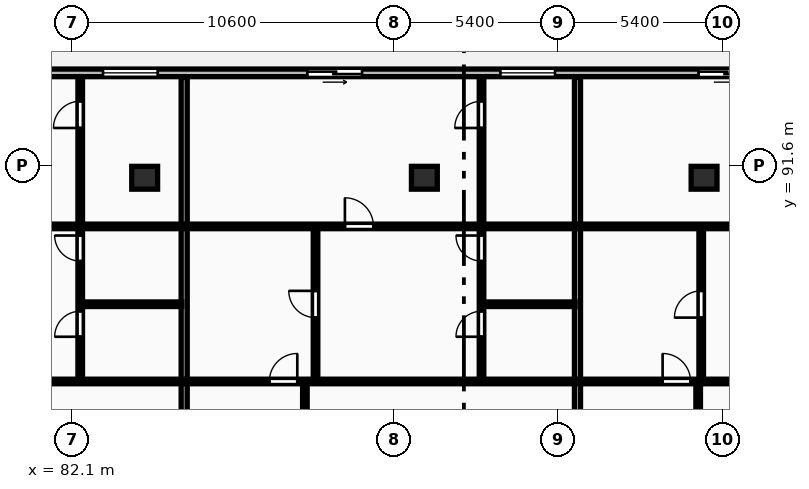
"""IFC4 building model, lengths in metres.
Left out: names, types, materials, properties, quantities, classifications, styles, units other than length and angle.
Written with IfcOpenShell. Run it as: python <this file> out.ifc"""

import sys

from ifc_helpers import new_model, si_unit, direction, frame, frame_2d, origin, origin_2d, place, context, subcontext, project, spatial, rectangle, extrude, element, fill, save


model = new_model("IFC4")
c1 = context("Model", 3, precision=1e-05, world=origin(), true_north=direction((0.0, 1.0)))
c2 = subcontext(c1, "Body", "Model", "MODEL_VIEW")
j1 = project(units=[si_unit("LENGTHUNIT", "METRE"), si_unit("PLANEANGLEUNIT", "RADIAN")], contexts=[c1])
p1 = place(None, origin())
s1 = spatial("IfcSite", under=j1, at=p1, CompositionType="ELEMENT")
p2 = place(p1, origin())
s2 = spatial("IfcBuilding", under=s1, at=p2, CompositionType="ELEMENT")
p3 = place(p2, frame((0.0, 0.0, 207.6)))
s3 = spatial("IfcBuildingStorey", under=s2, at=p3, CompositionType="ELEMENT", Elevation=207.6)
for number, where, z_axis, x_axis in (
    (1, (84.5, 91.2, 0.0), (0.0, 0.0, 1.0), (1.0, 0.0, 0.0)),
    (2, (93.7, 91.2, 0.0), (0.0, 0.0, 1.0), (1.0, 0.0, 0.0)),
    (3, (102.9, 91.2, 0.0), (0.0, 0.0, 1.0), (1.0, 0.0, 0.0)),
):
    element("IfcColumn", number, at=place(p3, frame(where, z_axis=z_axis, x_axis=x_axis)), inside=s3, PredefinedType="COLUMN", context=c2, shape_type="SweptSolid", body=[
        extrude(rectangle(XDim=0.85, YDim=0.75, at=origin_2d()), origin(), (0.0, 0.0, 1.0), 3.25),
    ])
p4 = place(p3, frame((128.4, 94.65, 0.0), z_axis=(0.0, 0.0, 1.0), x_axis=(-1.0, 0.0, 0.0)))
e4 = element("IfcWall", 4, at=p4, inside=s3, PredefinedType="STANDARD", context=c2, shape_type="SweptSolid", body=[
    extrude(rectangle(XDim=68.6, YDim=0.25, at=frame_2d((34.3, 0.0))), origin(), (0.0, 0.0, 1.0), 2.97),
])
p5 = place(p4, frame((62.6, 0.0, 0.0)))
e5 = element("IfcOpeningElement", 5, at=p5, cuts=e4, PredefinedType="OPENING", context=c2, shape_type="SweptSolid", body=[
    extrude(rectangle(XDim=1.8, YDim=2.2, at=frame_2d((0.9, 1.1))), frame((0.0, 0.135, 0.0), z_axis=(0.0, -1.0, 0.0), x_axis=(1.0, 0.0, 0.0)), (0.0, 0.0, 1.0), 0.27),
])
p6 = place(p4, frame((56.252, 0.0, 0.85)))
e6 = element("IfcOpeningElement", 6, at=p6, cuts=e4, PredefinedType="OPENING", context=c2, shape_type="SweptSolid", body=[
    extrude(rectangle(XDim=1.8, YDim=1.8, at=frame_2d((0.9, 0.9))), frame((0.0, 0.135, 0.0), z_axis=(0.0, -1.0, 0.0), x_axis=(1.0, 0.0, 0.0)), (0.0, 0.0, 1.0), 0.27),
])
p7 = place(p4, frame((49.882, 0.0, 0.0)))
e7 = element("IfcOpeningElement", 7, at=p7, cuts=e4, PredefinedType="OPENING", context=c2, shape_type="SweptSolid", body=[
    extrude(rectangle(XDim=1.8, YDim=2.2, at=frame_2d((0.9, 1.1))), frame((0.0, 0.135, 0.0), z_axis=(0.0, -1.0, 0.0), x_axis=(1.0, 0.0, 0.0)), (0.0, 0.0, 1.0), 0.27),
])
p8 = place(p4, frame((43.47, 0.0, 0.85)))
e8 = element("IfcOpeningElement", 8, at=p8, cuts=e4, PredefinedType="OPENING", context=c2, shape_type="SweptSolid", body=[
    extrude(rectangle(XDim=1.8, YDim=1.8, at=frame_2d((0.9, 0.9))), frame((0.0, 0.135, 0.0), z_axis=(0.0, -1.0, 0.0), x_axis=(1.0, 0.0, 0.0)), (0.0, 0.0, 1.0), 0.27),
])
p9 = place(p4, frame((36.75, 0.0, 0.0)))
e9 = element("IfcOpeningElement", 9, at=p9, cuts=e4, PredefinedType="OPENING", context=c2, shape_type="SweptSolid", body=[
    extrude(rectangle(XDim=1.8, YDim=2.2, at=frame_2d((0.9, 1.1))), frame((0.0, 0.135, 0.0), z_axis=(0.0, -1.0, 0.0), x_axis=(1.0, 0.0, 0.0)), (0.0, 0.0, 1.0), 0.27),
])
p10 = place(p4, frame((30.402, 0.0, 0.85)))
e10 = element("IfcOpeningElement", 10, at=p10, cuts=e4, PredefinedType="OPENING", context=c2, shape_type="SweptSolid", body=[
    extrude(rectangle(XDim=1.8, YDim=1.8, at=frame_2d((0.9, 0.9))), frame((0.0, 0.135, 0.0), z_axis=(0.0, -1.0, 0.0), x_axis=(1.0, 0.0, 0.0)), (0.0, 0.0, 1.0), 0.27),
])
p11 = place(p4, frame((23.882, 0.0, 0.0)))
e11 = element("IfcOpeningElement", 11, at=p11, cuts=e4, PredefinedType="OPENING", context=c2, shape_type="SweptSolid", body=[
    extrude(rectangle(XDim=1.8, YDim=2.2, at=frame_2d((0.9, 1.1))), frame((0.0, 0.135, 0.0), z_axis=(0.0, -1.0, 0.0), x_axis=(1.0, 0.0, 0.0)), (0.0, 0.0, 1.0), 0.27),
])
p12 = place(p4, frame((17.47, 0.0, 0.85)))
e12 = element("IfcOpeningElement", 12, at=p12, cuts=e4, PredefinedType="OPENING", context=c2, shape_type="SweptSolid", body=[
    extrude(rectangle(XDim=1.8, YDim=1.8, at=frame_2d((0.9, 0.9))), frame((0.0, 0.135, 0.0), z_axis=(0.0, -1.0, 0.0), x_axis=(1.0, 0.0, 0.0)), (0.0, 0.0, 1.0), 0.27),
])
p13 = place(p4, frame((9.48, 0.0, 0.85)))
e13 = element("IfcOpeningElement", 13, at=p13, cuts=e4, PredefinedType="OPENING", context=c2, shape_type="SweptSolid", body=[
    extrude(rectangle(XDim=1.8, YDim=1.8, at=frame_2d((0.9, 0.9))), frame((0.0, 0.135, 0.0), z_axis=(0.0, -1.0, 0.0), x_axis=(1.0, 0.0, 0.0)), (0.0, 0.0, 1.0), 0.27),
])
p14 = place(p4, frame((5.23, 0.0, 0.85)))
e14 = element("IfcOpeningElement", 14, at=p14, cuts=e4, PredefinedType="OPENING", context=c2, shape_type="SweptSolid", body=[
    extrude(rectangle(XDim=2.4, YDim=1.9, at=frame_2d((1.2, 0.95))), frame((0.0, 0.135, 0.0), z_axis=(0.0, -1.0, 0.0), x_axis=(1.0, 0.0, 0.0)), (0.0, 0.0, 1.0), 0.27),
])
p15 = place(p4, frame((13.455, 0.0, 0.0)))
e15 = element("IfcOpeningElement", 15, at=p15, cuts=e4, PredefinedType="OPENING", context=c2, shape_type="SweptSolid", body=[
    extrude(rectangle(XDim=1.8, YDim=2.2, at=frame_2d((0.9, 1.1))), frame((0.0, 0.135, 0.0), z_axis=(0.0, -1.0, 0.0), x_axis=(1.0, 0.0, 0.0)), (0.0, 0.0, 1.0), 0.27),
])
p16 = place(p4, frame((1.025, 0.0, 0.85)))
e16 = element("IfcOpeningElement", 16, at=p16, cuts=e4, PredefinedType="OPENING", context=c2, shape_type="SweptSolid", body=[
    extrude(rectangle(XDim=2.4, YDim=1.9, at=frame_2d((1.2, 0.95))), frame((0.0, 0.135, 0.0), z_axis=(0.0, -1.0, 0.0), x_axis=(1.0, 0.0, 0.0)), (0.0, 0.0, 1.0), 0.27),
])
p17 = place(p3, frame((85.8, 70.18, 0.0), z_axis=(0.0, 0.0, 1.0), x_axis=(0.0, 1.0, 0.0)))
e17 = element("IfcWall", 17, at=p17, inside=s3, PredefinedType="PARTITIONING", context=c2, shape_type="SweptSolid", body=[
    extrude(rectangle(XDim=24.32, YDim=0.2, at=frame_2d((12.16, 0.0))), origin(), (0.0, 0.0, 1.0), 2.97),
])
p18 = place(p3, frame((82.44, 87.04, 0.0), z_axis=(0.0, 0.0, 1.0), x_axis=(1.0, 0.0, 0.0)))
e18 = element("IfcWall", 18, at=p18, inside=s3, PredefinedType="PARTITIONING", context=c2, shape_type="SweptSolid", body=[
    extrude(rectangle(XDim=3.28, YDim=0.15, at=frame_2d((1.64, 0.0))), origin(), (0.0, 0.0, 1.0), 2.97),
])
p19 = place(p3, frame((82.38, 84.54, 0.0), z_axis=(0.0, 0.0, 1.0), x_axis=(0.0, 1.0, 0.0)))
e19 = element("IfcWall", 19, at=p19, inside=s3, PredefinedType="PARTITIONING", context=c2, shape_type="SweptSolid", body=[
    extrude(rectangle(XDim=9.96, YDim=0.15, at=frame_2d((4.98, 0.0))), origin(), (0.0, 0.0, 1.0), 2.97),
])
p20 = place(p19, frame((1.43, 0.0, 0.0)))
e20 = element("IfcOpeningElement", 20, at=p20, cuts=e19, PredefinedType="OPENING", context=c2, shape_type="SweptSolid", body=[
    extrude(rectangle(XDim=0.84, YDim=2.04, at=frame_2d((0.42, 1.02))), frame((0.0, 0.085, 0.0), z_axis=(0.0, -1.0, 0.0), x_axis=(1.0, 0.0, 0.0)), (0.0, 0.0, 1.0), 0.17),
])
p21 = place(p19, frame((3.92, 0.0, 0.0)))
e21 = element("IfcOpeningElement", 21, at=p21, cuts=e19, PredefinedType="OPENING", context=c2, shape_type="SweptSolid", body=[
    extrude(rectangle(XDim=0.84, YDim=2.04, at=frame_2d((0.42, 1.02))), frame((0.0, 0.085, 0.0), z_axis=(0.0, -1.0, 0.0), x_axis=(1.0, 0.0, 0.0)), (0.0, 0.0, 1.0), 0.17),
])
p22 = place(p19, frame((8.297, 0.0, 0.0)))
e22 = element("IfcOpeningElement", 22, at=p22, cuts=e19, PredefinedType="OPENING", context=c2, shape_type="SweptSolid", body=[
    extrude(rectangle(XDim=0.88, YDim=2.06, at=frame_2d((0.44, 1.03))), frame((0.0, 0.085, 0.0), z_axis=(0.0, -1.0, 0.0), x_axis=(1.0, 0.0, 0.0)), (0.0, 0.0, 1.0), 0.17),
])
p23 = place(p3, frame((72.816, 84.5, 0.0), z_axis=(0.0, 0.0, 1.0), x_axis=(1.0, 0.0, 0.0)))
e23 = element("IfcWall", 23, at=p23, inside=s3, PredefinedType="PARTITIONING", context=c2, shape_type="SweptSolid", body=[
    extrude(rectangle(XDim=12.904, YDim=0.15, at=frame_2d((6.452, 0.0))), origin(), (0.0, 0.0, 1.0), 2.97),
])
p24 = place(p23, frame((2.72, 0.0, 0.0)))
e24 = element("IfcOpeningElement", 24, at=p24, cuts=e23, PredefinedType="OPENING", context=c2, shape_type="SweptSolid", body=[
    extrude(rectangle(XDim=0.92, YDim=2.08, at=frame_2d((0.46, 1.04))), frame((0.0, 0.085, 0.0), z_axis=(0.0, -1.0, 0.0), x_axis=(1.0, 0.0, 0.0)), (0.0, 0.0, 1.0), 0.17),
])
p25 = place(p3, frame((72.816, 89.6, 0.0), z_axis=(0.0, 0.0, 1.0), x_axis=(1.0, 0.0, 0.0)))
e25 = element("IfcWall", 25, at=p25, inside=s3, PredefinedType="PARTITIONING", context=c2, shape_type="SweptSolid", body=[
    extrude(rectangle(XDim=12.904, YDim=0.15, at=frame_2d((6.452, 0.0))), origin(), (0.0, 0.0, 1.0), 2.97),
])
p26 = place(p25, frame((5.982, 0.0, 0.0)))
e26 = element("IfcOpeningElement", 26, at=p26, cuts=e25, PredefinedType="OPENING", context=c2, shape_type="SweptSolid", body=[
    extrude(rectangle(XDim=0.94, YDim=2.1, at=frame_2d((0.47, 1.05))), frame((0.0, 0.085, 0.0), z_axis=(0.0, -1.0, 0.0), x_axis=(1.0, 0.0, 0.0)), (0.0, 0.0, 1.0), 0.17),
])
p27 = place(p3, frame((98.736, 70.18, 0.0), z_axis=(0.0, 0.0, 1.0), x_axis=(0.0, 1.0, 0.0)))
e27 = element("IfcWall", 27, at=p27, inside=s3, PredefinedType="PARTITIONING", context=c2, shape_type="SweptSolid", body=[
    extrude(rectangle(XDim=24.32, YDim=0.2, at=frame_2d((12.16, 0.0))), origin(), (0.0, 0.0, 1.0), 2.97),
])
p28 = place(p3, frame((89.77, 70.16, 0.0), z_axis=(0.0, 0.0, 1.0), x_axis=(0.0, 1.0, 0.0)))
e28 = element("IfcWall", 28, at=p28, inside=s3, PredefinedType="PARTITIONING", context=c2, shape_type="SweptSolid", body=[
    extrude(rectangle(XDim=14.3, YDim=0.15, at=frame_2d((7.15, 0.0))), origin(), (0.0, 0.0, 1.0), 2.97),
])
p29 = place(p28, frame((5.84, 0.0, 0.0)))
e29 = element("IfcOpeningElement", 29, at=p29, cuts=e28, PredefinedType="OPENING", context=c2, shape_type="SweptSolid", body=[
    extrude(rectangle(XDim=0.88, YDim=2.06, at=frame_2d((0.44, 1.03))), frame((0.0, 0.085, 0.0), z_axis=(0.0, -1.0, 0.0), x_axis=(1.0, 0.0, 0.0)), (0.0, 0.0, 1.0), 0.17),
])
p30 = place(p3, frame((90.12, 84.54, 0.0), z_axis=(0.0, 0.0, 1.0), x_axis=(0.0, 1.0, 0.0)))
e30 = element("IfcWall", 30, at=p30, inside=s3, PredefinedType="PARTITIONING", context=c2, shape_type="SweptSolid", body=[
    extrude(rectangle(XDim=5.0, YDim=0.15, at=frame_2d((2.5, 0.0))), origin(), (0.0, 0.0, 1.0), 2.97),
])
p31 = place(p30, frame((2.06, 0.0, 0.0)))
e31 = element("IfcOpeningElement", 31, at=p31, cuts=e30, PredefinedType="OPENING", context=c2, shape_type="SweptSolid", body=[
    extrude(rectangle(XDim=0.88, YDim=2.06, at=frame_2d((0.44, 1.03))), frame((0.0, 0.085, 0.0), z_axis=(0.0, -1.0, 0.0), x_axis=(1.0, 0.0, 0.0)), (0.0, 0.0, 1.0), 0.17),
])
p32 = place(p3, frame((95.64, 87.04, 0.0), z_axis=(0.0, 0.0, 1.0), x_axis=(1.0, 0.0, 0.0)))
e32 = element("IfcWall", 32, at=p32, inside=s3, PredefinedType="PARTITIONING", context=c2, shape_type="SweptSolid", body=[
    extrude(rectangle(XDim=3.016, YDim=0.15, at=frame_2d((1.508, 0.0))), origin(), (0.0, 0.0, 1.0), 2.97),
])
p33 = place(p3, frame((95.58, 84.54, 0.0), z_axis=(0.0, 0.0, 1.0), x_axis=(0.0, 1.0, 0.0)))
e33 = element("IfcWall", 33, at=p33, inside=s3, PredefinedType="PARTITIONING", context=c2, shape_type="SweptSolid", body=[
    extrude(rectangle(XDim=9.96, YDim=0.15, at=frame_2d((4.98, 0.0))), origin(), (0.0, 0.0, 1.0), 2.97),
])
p34 = place(p33, frame((1.43, 0.0, 0.0)))
e34 = element("IfcOpeningElement", 34, at=p34, cuts=e33, PredefinedType="OPENING", context=c2, shape_type="SweptSolid", body=[
    extrude(rectangle(XDim=0.84, YDim=2.04, at=frame_2d((0.42, 1.02))), frame((0.0, 0.085, 0.0), z_axis=(0.0, -1.0, 0.0), x_axis=(1.0, 0.0, 0.0)), (0.0, 0.0, 1.0), 0.17),
])
p35 = place(p33, frame((3.92, 0.0, 0.0)))
e35 = element("IfcOpeningElement", 35, at=p35, cuts=e33, PredefinedType="OPENING", context=c2, shape_type="SweptSolid", body=[
    extrude(rectangle(XDim=0.84, YDim=2.04, at=frame_2d((0.42, 1.02))), frame((0.0, 0.085, 0.0), z_axis=(0.0, -1.0, 0.0), x_axis=(1.0, 0.0, 0.0)), (0.0, 0.0, 1.0), 0.17),
])
p36 = place(p33, frame((8.297, 0.0, 0.0)))
e36 = element("IfcOpeningElement", 36, at=p36, cuts=e33, PredefinedType="OPENING", context=c2, shape_type="SweptSolid", body=[
    extrude(rectangle(XDim=0.88, YDim=2.06, at=frame_2d((0.44, 1.03))), frame((0.0, 0.085, 0.0), z_axis=(0.0, -1.0, 0.0), x_axis=(1.0, 0.0, 0.0)), (0.0, 0.0, 1.0), 0.17),
])
p37 = place(p3, frame((85.88, 84.5, 0.0), z_axis=(0.0, 0.0, 1.0), x_axis=(1.0, 0.0, 0.0)))
e37 = element("IfcWall", 37, at=p37, inside=s3, PredefinedType="PARTITIONING", context=c2, shape_type="SweptSolid", body=[
    extrude(rectangle(XDim=12.776, YDim=0.15, at=frame_2d((6.388, 0.0))), origin(), (0.0, 0.0, 1.0), 2.97),
])
p38 = place(p37, frame((2.72, 0.0, 0.0)))
e38 = element("IfcOpeningElement", 38, at=p38, cuts=e37, PredefinedType="OPENING", context=c2, shape_type="SweptSolid", body=[
    extrude(rectangle(XDim=0.92, YDim=2.08, at=frame_2d((0.46, 1.04))), frame((0.0, 0.085, 0.0), z_axis=(0.0, -1.0, 0.0), x_axis=(1.0, 0.0, 0.0)), (0.0, 0.0, 1.0), 0.17),
])
p39 = place(p3, frame((85.88, 89.6, 0.0), z_axis=(0.0, 0.0, 1.0), x_axis=(1.0, 0.0, 0.0)))
e39 = element("IfcWall", 39, at=p39, inside=s3, PredefinedType="PARTITIONING", context=c2, shape_type="SweptSolid", body=[
    extrude(rectangle(XDim=12.776, YDim=0.15, at=frame_2d((6.388, 0.0))), origin(), (0.0, 0.0, 1.0), 2.97),
])
p40 = place(p39, frame((5.206, 0.0, 0.0)))
e40 = element("IfcOpeningElement", 40, at=p40, cuts=e39, PredefinedType="OPENING", context=c2, shape_type="SweptSolid", body=[
    extrude(rectangle(XDim=0.94, YDim=2.1, at=frame_2d((0.47, 1.05))), frame((0.0, 0.085, 0.0), z_axis=(0.0, -1.0, 0.0), x_axis=(1.0, 0.0, 0.0)), (0.0, 0.0, 1.0), 0.17),
])
p41 = place(p3, frame((102.706, 70.16, 0.0), z_axis=(0.0, 0.0, 1.0), x_axis=(0.0, 1.0, 0.0)))
e41 = element("IfcWall", 41, at=p41, inside=s3, PredefinedType="PARTITIONING", context=c2, shape_type="SweptSolid", body=[
    extrude(rectangle(XDim=14.3, YDim=0.15, at=frame_2d((7.15, 0.0))), origin(), (0.0, 0.0, 1.0), 2.277),
])
p42 = place(p41, frame((6.02, 0.0, 0.0)))
e42 = element("IfcOpeningElement", 42, at=p42, cuts=e41, PredefinedType="OPENING", context=c2, shape_type="SweptSolid", body=[
    extrude(rectangle(XDim=0.88, YDim=2.06, at=frame_2d((0.44, 1.03))), frame((0.0, 0.085, 0.0), z_axis=(0.0, -1.0, 0.0), x_axis=(1.0, 0.0, 0.0)), (0.0, 0.0, 1.0), 0.17),
])
p43 = place(p3, frame((102.806, 84.54, 0.0), z_axis=(0.0, 0.0, 1.0), x_axis=(0.0, 1.0, 0.0)))
e43 = element("IfcWall", 43, at=p43, inside=s3, PredefinedType="PARTITIONING", context=c2, shape_type="SweptSolid", body=[
    extrude(rectangle(XDim=5.0, YDim=0.15, at=frame_2d((2.5, 0.0))), origin(), (0.0, 0.0, 1.0), 2.277),
])
p44 = place(p43, frame((2.06, 0.0, 0.0)))
e44 = element("IfcOpeningElement", 44, at=p44, cuts=e43, PredefinedType="OPENING", context=c2, shape_type="SweptSolid", body=[
    extrude(rectangle(XDim=0.88, YDim=2.06, at=frame_2d((0.44, 1.03))), frame((0.0, 0.085, 0.0), z_axis=(0.0, -1.0, 0.0), x_axis=(1.0, 0.0, 0.0)), (0.0, 0.0, 1.0), 0.17),
])
p45 = place(p3, frame((98.816, 84.5, 0.0), z_axis=(0.0, 0.0, 1.0), x_axis=(1.0, 0.0, 0.0)))
e45 = element("IfcWall", 45, at=p45, inside=s3, PredefinedType="PARTITIONING", context=c2, shape_type="SweptSolid", body=[
    extrude(rectangle(XDim=12.904, YDim=0.15, at=frame_2d((6.452, 0.0))), origin(), (0.0, 0.0, 1.0), 2.97),
])
p46 = place(p45, frame((2.72, 0.0, 0.0)))
e46 = element("IfcOpeningElement", 46, at=p46, cuts=e45, PredefinedType="OPENING", context=c2, shape_type="SweptSolid", body=[
    extrude(rectangle(XDim=0.92, YDim=2.08, at=frame_2d((0.46, 1.04))), frame((0.0, 0.085, 0.0), z_axis=(0.0, -1.0, 0.0), x_axis=(1.0, 0.0, 0.0)), (0.0, 0.0, 1.0), 0.17),
])
p47 = place(p3, frame((98.816, 89.6, 0.0), z_axis=(0.0, 0.0, 1.0), x_axis=(1.0, 0.0, 0.0)))
e47 = element("IfcWall", 47, at=p47, inside=s3, PredefinedType="PARTITIONING", context=c2, shape_type="SweptSolid", body=[
    extrude(rectangle(XDim=12.904, YDim=0.15, at=frame_2d((6.452, 0.0))), origin(), (0.0, 0.0, 1.0), 2.97),
])
p48 = place(p47, frame((5.982, 0.0, 0.0)))
e48 = element("IfcOpeningElement", 48, at=p48, cuts=e47, PredefinedType="OPENING", context=c2, shape_type="SweptSolid", body=[
    extrude(rectangle(XDim=0.94, YDim=2.1, at=frame_2d((0.47, 1.05))), frame((0.0, 0.085, 0.0), z_axis=(0.0, -1.0, 0.0), x_axis=(1.0, 0.0, 0.0)), (0.0, 0.0, 1.0), 0.17),
])
p49 = place(p8, origin())
e49 = element("IfcWindow", 49, at=p49, inside=s3, PartitioningType="SINGLE_PANEL", PredefinedType="WINDOW", context=c2, shape_type="SweptSolid", body=[
    extrude(rectangle(XDim=1.8, YDim=1.8, at=frame_2d((0.9, 0.9))), frame((0.0, 0.03, 0.0), z_axis=(0.0, -1.0, 0.0), x_axis=(1.0, 0.0, 0.0)), (0.0, 0.0, 1.0), 0.06),
])
fill(e8, e49)
p50 = place(p9, origin())
e50 = element("IfcDoor", 50, at=p50, inside=s3, OperationType="SLIDING_TO_LEFT", PredefinedType="DOOR", context=c2, shape_type="SweptSolid", body=[
    extrude(rectangle(XDim=1.8, YDim=2.2, at=frame_2d((0.9, 1.1))), frame((0.0, 0.025, 0.0), z_axis=(0.0, -1.0, 0.0), x_axis=(1.0, 0.0, 0.0)), (0.0, 0.0, 1.0), 0.05),
])
fill(e9, e50)
p51 = place(p10, origin())
e51 = element("IfcWindow", 51, at=p51, inside=s3, PartitioningType="SINGLE_PANEL", PredefinedType="WINDOW", context=c2, shape_type="SweptSolid", body=[
    extrude(rectangle(XDim=1.8, YDim=1.8, at=frame_2d((0.9, 0.9))), frame((0.0, 0.03, 0.0), z_axis=(0.0, -1.0, 0.0), x_axis=(1.0, 0.0, 0.0)), (0.0, 0.0, 1.0), 0.06),
])
fill(e10, e51)
p52 = place(p11, origin())
e52 = element("IfcDoor", 52, at=p52, inside=s3, OperationType="SLIDING_TO_LEFT", PredefinedType="DOOR", context=c2, shape_type="SweptSolid", body=[
    extrude(rectangle(XDim=1.8, YDim=2.2, at=frame_2d((0.9, 1.1))), frame((0.0, 0.025, 0.0), z_axis=(0.0, -1.0, 0.0), x_axis=(1.0, 0.0, 0.0)), (0.0, 0.0, 1.0), 0.05),
])
fill(e11, e52)
p53 = place(p20, origin())
e53 = element("IfcDoor", 53, at=p53, inside=s3, OperationType="SINGLE_SWING_LEFT", PredefinedType="DOOR", context=c2, shape_type="SweptSolid", body=[
    extrude(rectangle(XDim=0.84, YDim=2.04, at=frame_2d((0.42, 1.02))), frame((0.0, 0.025, 0.0), z_axis=(0.0, -1.0, 0.0), x_axis=(1.0, 0.0, 0.0)), (0.0, 0.0, 1.0), 0.05),
])
fill(e20, e53)
p54 = place(p21, origin())
e54 = element("IfcDoor", 54, at=p54, inside=s3, OperationType="SINGLE_SWING_RIGHT", PredefinedType="DOOR", context=c2, shape_type="SweptSolid", body=[
    extrude(rectangle(XDim=0.84, YDim=2.04, at=frame_2d((0.42, 1.02))), frame((0.0, 0.025, 0.0), z_axis=(0.0, -1.0, 0.0), x_axis=(1.0, 0.0, 0.0)), (0.0, 0.0, 1.0), 0.05),
])
fill(e21, e54)
p55 = place(p22, origin())
e55 = element("IfcDoor", 55, at=p55, inside=s3, OperationType="SINGLE_SWING_LEFT", PredefinedType="DOOR", context=c2, shape_type="SweptSolid", body=[
    extrude(rectangle(XDim=0.88, YDim=2.06, at=frame_2d((0.44, 1.03))), frame((0.0, 0.025, 0.0), z_axis=(0.0, -1.0, 0.0), x_axis=(1.0, 0.0, 0.0)), (0.0, 0.0, 1.0), 0.05),
])
fill(e22, e55)
p56 = place(p31, origin())
e56 = element("IfcDoor", 56, at=p56, inside=s3, OperationType="SINGLE_SWING_RIGHT", PredefinedType="DOOR", context=c2, shape_type="SweptSolid", body=[
    extrude(rectangle(XDim=0.88, YDim=2.06, at=frame_2d((0.44, 1.03))), frame((0.0, 0.025, 0.0), z_axis=(0.0, -1.0, 0.0), x_axis=(1.0, 0.0, 0.0)), (0.0, 0.0, 1.0), 0.05),
])
fill(e31, e56)
p57 = place(p34, origin())
e57 = element("IfcDoor", 57, at=p57, inside=s3, OperationType="SINGLE_SWING_LEFT", PredefinedType="DOOR", context=c2, shape_type="SweptSolid", body=[
    extrude(rectangle(XDim=0.84, YDim=2.04, at=frame_2d((0.42, 1.02))), frame((0.0, 0.025, 0.0), z_axis=(0.0, -1.0, 0.0), x_axis=(1.0, 0.0, 0.0)), (0.0, 0.0, 1.0), 0.05),
])
fill(e34, e57)
p58 = place(p35, origin())
e58 = element("IfcDoor", 58, at=p58, inside=s3, OperationType="SINGLE_SWING_RIGHT", PredefinedType="DOOR", context=c2, shape_type="SweptSolid", body=[
    extrude(rectangle(XDim=0.84, YDim=2.04, at=frame_2d((0.42, 1.02))), frame((0.0, 0.025, 0.0), z_axis=(0.0, -1.0, 0.0), x_axis=(1.0, 0.0, 0.0)), (0.0, 0.0, 1.0), 0.05),
])
fill(e35, e58)
p59 = place(p36, origin())
e59 = element("IfcDoor", 59, at=p59, inside=s3, OperationType="SINGLE_SWING_LEFT", PredefinedType="DOOR", context=c2, shape_type="SweptSolid", body=[
    extrude(rectangle(XDim=0.88, YDim=2.06, at=frame_2d((0.44, 1.03))), frame((0.0, 0.025, 0.0), z_axis=(0.0, -1.0, 0.0), x_axis=(1.0, 0.0, 0.0)), (0.0, 0.0, 1.0), 0.05),
])
fill(e36, e59)
p60 = place(p38, origin())
e60 = element("IfcDoor", 60, at=p60, inside=s3, OperationType="SINGLE_SWING_RIGHT", PredefinedType="DOOR", context=c2, shape_type="SweptSolid", body=[
    extrude(rectangle(XDim=0.92, YDim=2.08, at=frame_2d((0.46, 1.04))), frame((0.0, 0.025, 0.0), z_axis=(0.0, -1.0, 0.0), x_axis=(1.0, 0.0, 0.0)), (0.0, 0.0, 1.0), 0.05),
])
fill(e38, e60)
p61 = place(p40, origin())
e61 = element("IfcDoor", 61, at=p61, inside=s3, OperationType="SINGLE_SWING_LEFT", PredefinedType="DOOR", context=c2, shape_type="SweptSolid", body=[
    extrude(rectangle(XDim=0.94, YDim=2.1, at=frame_2d((0.47, 1.05))), frame((0.0, 0.025, 0.0), z_axis=(0.0, -1.0, 0.0), x_axis=(1.0, 0.0, 0.0)), (0.0, 0.0, 1.0), 0.05),
])
fill(e40, e61)
p62 = place(p44, origin())
e62 = element("IfcDoor", 62, at=p62, inside=s3, OperationType="SINGLE_SWING_LEFT", PredefinedType="DOOR", context=c2, shape_type="SweptSolid", body=[
    extrude(rectangle(XDim=0.88, YDim=2.06, at=frame_2d((0.44, 1.03))), frame((0.0, 0.025, 0.0), z_axis=(0.0, -1.0, 0.0), x_axis=(1.0, 0.0, 0.0)), (0.0, 0.0, 1.0), 0.05),
])
fill(e44, e62)
p63 = place(p46, origin())
e63 = element("IfcDoor", 63, at=p63, inside=s3, OperationType="SINGLE_SWING_LEFT", PredefinedType="DOOR", context=c2, shape_type="SweptSolid", body=[
    extrude(rectangle(XDim=0.92, YDim=2.08, at=frame_2d((0.46, 1.04))), frame((0.0, 0.025, 0.0), z_axis=(0.0, -1.0, 0.0), x_axis=(1.0, 0.0, 0.0)), (0.0, 0.0, 1.0), 0.05),
])
fill(e46, e63)
save(model, sys.argv[1])
